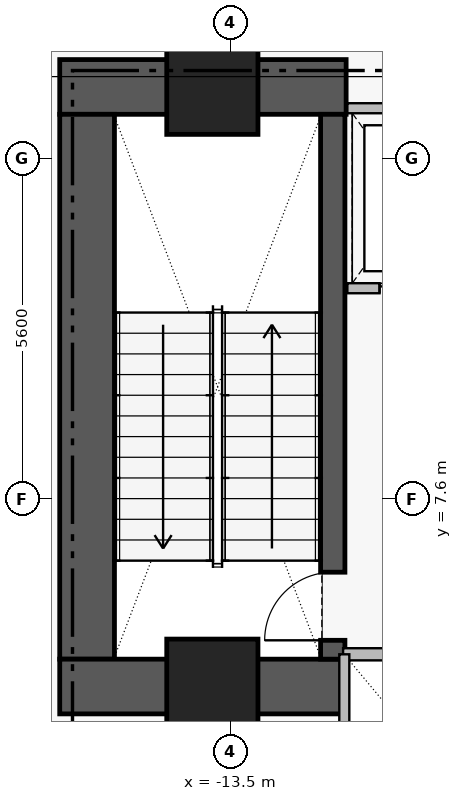
"""IFC4 building model, lengths in metres.
Left out: names, types, materials, properties, quantities, classifications, styles, units other than length and angle.
Written with IfcOpenShell. Run it as: python <this file> out.ifc"""

import sys

from ifc_helpers import new_model, si_unit, direction, frame, frame_2d, origin, origin_2d, place, context, subcontext, project, spatial, rectangle, extrude, element, fill, save


model = new_model("IFC4")
c1 = context("Model", 3, precision=1e-05, world=origin(), true_north=direction((0.0, 1.0)))
c2 = subcontext(c1, "Body", "Model", "MODEL_VIEW")
j1 = project(units=[si_unit("LENGTHUNIT", "METRE"), si_unit("PLANEANGLEUNIT", "RADIAN")], contexts=[c1])
p1 = place(None, origin())
s1 = spatial("IfcSite", under=j1, at=p1, CompositionType="ELEMENT")
p2 = place(p1, origin())
s2 = spatial("IfcBuilding", under=s1, at=p2, CompositionType="ELEMENT")
p3 = place(p2, frame((0.0, 0.0, 18.0)))
s3 = spatial("IfcBuildingStorey", under=s2, at=p3, CompositionType="ELEMENT", Elevation=18.0)
p4 = place(p3, frame((-16.31, 14.38, 0.0), z_axis=(0.0, 0.0, 1.0), x_axis=(1.0, 0.0, 0.0)))
e1 = element("IfcWall", 1, at=p4, inside=s3, PredefinedType="SHEAR", context=c2, shape_type="SweptSolid", body=[
    extrude(rectangle(XDim=4.71, YDim=0.9, at=frame_2d((2.355, 0.0))), origin(), (0.0, 0.0, 1.0), 4.61),
])
p5 = place(p3, frame((-15.86, 4.97, 0.0), z_axis=(0.0, 0.0, 1.0), x_axis=(0.0, 1.0, 0.0)))
e2 = element("IfcWall", 2, at=p5, inside=s3, PredefinedType="SHEAR", context=c2, shape_type="SweptSolid", body=[
    extrude(rectangle(XDim=8.96, YDim=0.9, at=frame_2d((4.48, 0.0))), origin(), (0.0, 0.0, 1.0), 4.61),
])
p6 = place(p3, frame((-16.31, 4.52, 0.0), z_axis=(0.0, 0.0, 1.0), x_axis=(1.0, 0.0, 0.0)))
e3 = element("IfcWall", 3, at=p6, inside=s3, PredefinedType="SHEAR", context=c2, shape_type="SweptSolid", body=[
    extrude(rectangle(XDim=4.71, YDim=0.9, at=frame_2d((2.355, 0.0))), origin(), (0.0, 0.0, 1.0), 4.61),
])
p7 = place(p3, frame((-11.82, 4.97, 0.0), z_axis=(0.0, 0.0, 1.0), x_axis=(0.0, 1.0, 0.0)))
e4 = element("IfcWall", 4, at=p7, inside=s3, PredefinedType="SHEAR", context=c2, shape_type="SweptSolid", body=[
    extrude(rectangle(XDim=8.96, YDim=0.4, at=frame_2d((4.48, 0.0))), origin(), (0.0, 0.0, 1.0), 4.61),
])
p8 = place(p7, frame((0.31, 0.0, 0.0)))
e5 = element("IfcOpeningElement", 5, at=p8, cuts=e4, PredefinedType="OPENING", context=c2, shape_type="SweptSolid", body=[
    extrude(rectangle(XDim=1.12, YDim=2.22, at=frame_2d((0.56, 1.11))), frame((0.0, 0.21, 0.0), z_axis=(0.0, -1.0, 0.0), x_axis=(1.0, 0.0, 0.0)), (0.0, 0.0, 1.0), 0.42),
])
for number, where, z_axis, x_axis in (
    (6, (-13.8, 14.35, 0.0), (0.0, 0.0, 1.0), (1.0, 0.0, 0.0)),
    (7, (-13.8, 4.55, 0.0), (0.0, 0.0, 1.0), (1.0, 0.0, 0.0)),
):
    element("IfcColumn", number, at=place(p3, frame(where, z_axis=z_axis, x_axis=x_axis)), inside=s3, PredefinedType="COLUMN", context=c2, shape_type="SweptSolid", body=[
        extrude(rectangle(XDim=1.5, YDim=1.5, at=origin_2d()), origin(), (0.0, 0.0, 1.0), 4.8),
    ])
p9 = place(p3, frame((-11.58, 11.07, 0.0), z_axis=(0.0, 0.0, 1.0), x_axis=(1.0, 0.0, 0.0)))
e8 = element("IfcWall", 8, at=p9, inside=s3, PredefinedType="PARTITIONING", context=c2, shape_type="SweptSolid", body=[
    extrude(rectangle(XDim=2.16, YDim=0.165, at=frame_2d((1.08, 0.0))), origin(), (0.0, 0.0, 1.0), 4.54),
])
p10 = place(p9, frame((0.53, 0.0, 0.0)))
e9 = element("IfcOpeningElement", 9, at=p10, cuts=e8, PredefinedType="OPENING", context=c2, shape_type="SweptSolid", body=[
    extrude(rectangle(XDim=1.15, YDim=2.25, at=frame_2d((0.575, 1.125))), frame((0.0, 0.093, 0.0), z_axis=(0.0, -1.0, 0.0), x_axis=(1.0, 0.0, 0.0)), (0.0, 0.0, 1.0), 0.185),
])
p11 = place(p3, frame((-11.65, 5.05, 0.0), z_axis=(0.0, 0.0, 1.0), x_axis=(1.0, 0.0, 0.0)))
e10 = element("IfcWall", 10, at=p11, inside=s3, PredefinedType="PARTITIONING", context=c2, shape_type="SweptSolid", body=[
    extrude(rectangle(XDim=2.85, YDim=0.2, at=frame_2d((1.425, 0.0))), origin(), (0.0, 0.0, 1.0), 4.54),
])
p12 = place(p3, frame((-11.58, 14.03, 0.0), z_axis=(0.0, 0.0, 1.0), x_axis=(1.0, 0.0, 0.0)))
e11 = element("IfcWall", 11, at=p12, inside=s3, PredefinedType="PARTITIONING", context=c2, shape_type="SweptSolid", body=[
    extrude(rectangle(XDim=2.16, YDim=0.165, at=frame_2d((1.08, 0.0))), origin(), (0.0, 0.0, 1.0), 4.54),
])
p13 = place(p3, frame((-11.63, 2.47, 0.0), z_axis=(0.0, 0.0, 1.0), x_axis=(0.0, 1.0, 0.0)))
e12 = element("IfcWall", 12, at=p13, inside=s3, PredefinedType="PARTITIONING", context=c2, shape_type="SweptSolid", body=[
    extrude(rectangle(XDim=2.58, YDim=0.165, at=frame_2d((1.29, 0.0))), origin(), (0.0, 0.0, 1.0), 4.54),
])
p14 = place(p8, origin())
e13 = element("IfcDoor", 13, at=p14, inside=s3, OperationType="SINGLE_SWING_LEFT", PredefinedType="DOOR", context=c2, shape_type="SweptSolid", body=[
    extrude(rectangle(XDim=1.12, YDim=2.22, at=frame_2d((0.56, 1.11))), frame((0.0, 0.025, 0.0), z_axis=(0.0, -1.0, 0.0), x_axis=(1.0, 0.0, 0.0)), (0.0, 0.0, 1.0), 0.05),
])
fill(e5, e13)
p15 = place(p10, origin())
e14 = element("IfcDoor", 14, at=p15, inside=s3, OperationType="SLIDING_TO_LEFT", PredefinedType="DOOR", context=c2, shape_type="SweptSolid", body=[
    extrude(rectangle(XDim=1.15, YDim=2.25, at=frame_2d((0.575, 1.125))), frame((0.0, 0.025, 0.0), z_axis=(0.0, -1.0, 0.0), x_axis=(1.0, 0.0, 0.0)), (0.0, 0.0, 1.0), 0.05),
])
fill(e9, e14)
save(model, sys.argv[1])
